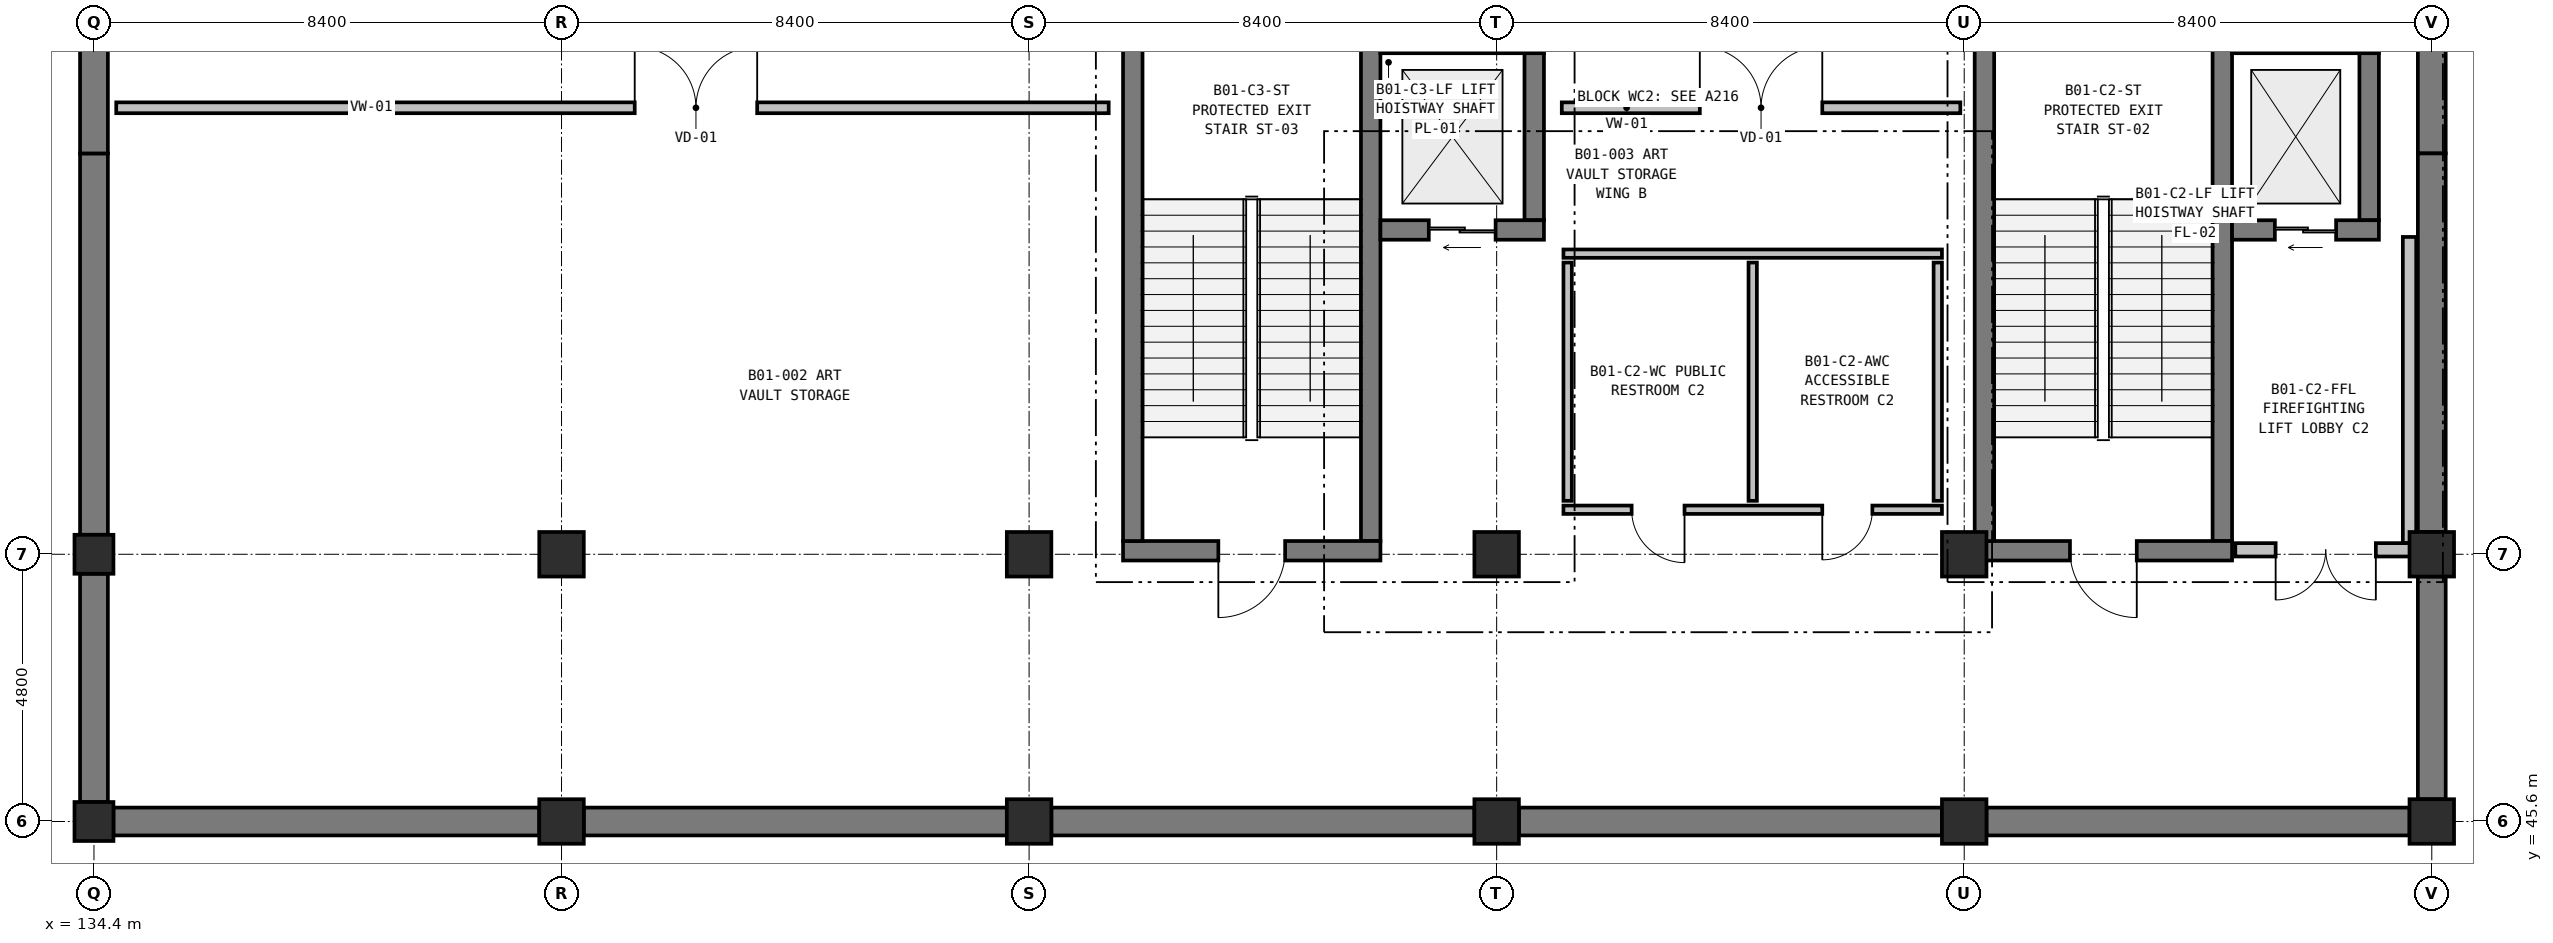
"""IFC4 building model, lengths in metres.
Left out: names, types, materials, properties, quantities, classifications, styles, units other than length and angle.
Written with IfcOpenShell. Run it as: python <this file> out.ifc"""

import sys

from ifc_helpers import new_model, si_unit, direction, frame, frame_2d, origin, origin_2d, place, context, subcontext, project, spatial, rectangle, extrude, element, fill, save


model = new_model("IFC4")
c1 = context("Model", 3, precision=1e-05, world=origin(), true_north=direction((0.0, 1.0)))
c2 = subcontext(c1, "Body", "Model", "MODEL_VIEW")
j1 = project(units=[si_unit("LENGTHUNIT", "METRE"), si_unit("PLANEANGLEUNIT", "RADIAN")], contexts=[c1])
p1 = place(None, origin())
s1 = spatial("IfcSite", under=j1, at=p1, CompositionType="ELEMENT")
p2 = place(p1, origin())
s2 = spatial("IfcBuilding", under=s1, at=p2, CompositionType="ELEMENT")
p3 = place(p2, frame((0.0, 0.0, -5.4)))
s3 = spatial("IfcBuildingStorey", under=s2, at=p3, CompositionType="ELEMENT", Elevation=-5.4)
for number, where, z_axis, x_axis in (
    (1, (134.4, 45.6, 0.0), (0.0, 0.0, 1.0), (1.0, 0.0, 0.0)),
    (2, (134.4, 50.4, 0.0), (0.0, 0.0, 1.0), (1.0, 0.0, 0.0)),
):
    element("IfcColumn", number, at=place(p3, frame(where, z_axis=z_axis, x_axis=x_axis)), inside=s3, PredefinedType="COLUMN", context=c2, shape_type="SweptSolid", body=[
        extrude(rectangle(XDim=0.7, YDim=0.7, at=origin_2d()), origin(), (0.0, 0.0, 1.0), 5.4),
    ])
for number, where, z_axis, x_axis in (
    (3, (142.8, 45.6, 0.0), (0.0, 0.0, 1.0), (1.0, 0.0, 0.0)),
    (4, (142.8, 50.4, 0.0), (0.0, 0.0, 1.0), (1.0, 0.0, 0.0)),
    (5, (151.2, 45.6, 0.0), (0.0, 0.0, 1.0), (1.0, 0.0, 0.0)),
    (6, (151.2, 50.4, 0.0), (0.0, 0.0, 1.0), (1.0, 0.0, 0.0)),
    (7, (159.6, 45.6, 0.0), (0.0, 0.0, 1.0), (1.0, 0.0, 0.0)),
    (8, (159.6, 50.4, 0.0), (0.0, 0.0, 1.0), (1.0, 0.0, 0.0)),
    (9, (168.0, 45.6, 0.0), (0.0, 0.0, 1.0), (1.0, 0.0, 0.0)),
    (10, (168.0, 50.4, 0.0), (0.0, 0.0, 1.0), (1.0, 0.0, 0.0)),
    (11, (176.4, 45.6, 0.0), (0.0, 0.0, 1.0), (1.0, 0.0, 0.0)),
    (12, (176.4, 50.4, 0.0), (0.0, 0.0, 1.0), (1.0, 0.0, 0.0)),
):
    element("IfcColumn", number, at=place(p3, frame(where, z_axis=z_axis, x_axis=x_axis)), inside=s3, PredefinedType="COLUMN", context=c2, shape_type="SweptSolid", body=[
        extrude(rectangle(XDim=0.8, YDim=0.8, at=origin_2d()), origin(), (0.0, 0.0, 1.0), 5.4),
    ])
p4 = place(p3, frame((176.4, 59.6, 0.0), z_axis=(0.0, 0.0, 1.0), x_axis=(0.0, -1.0, 0.0)))
e13 = element("IfcWall", 13, at=p4, inside=s3, PredefinedType="USERDEFINED", context=c2, shape_type="SweptSolid", body=[
    extrude(rectangle(XDim=2.0, YDim=0.5, at=frame_2d((1.0, 0.0))), origin(), (0.0, 0.0, 1.0), 5.06),
])
p5 = place(p3, frame((176.4, 57.6, 0.0), z_axis=(0.0, 0.0, 1.0), x_axis=(0.0, -1.0, 0.0)))
e14 = element("IfcWall", 14, at=p5, inside=s3, PredefinedType="USERDEFINED", context=c2, shape_type="SweptSolid", body=[
    extrude(rectangle(XDim=6.8, YDim=0.5, at=frame_2d((3.4, 0.0))), origin(), (0.0, 0.0, 1.0), 5.06),
])
p6 = place(p3, frame((176.4, 50.0, 0.0), z_axis=(0.0, 0.0, 1.0), x_axis=(0.0, -1.0, 0.0)))
e15 = element("IfcWall", 15, at=p6, inside=s3, PredefinedType="USERDEFINED", context=c2, shape_type="SweptSolid", body=[
    extrude(rectangle(XDim=4.0, YDim=0.5, at=frame_2d((2.0, 0.0))), origin(), (0.0, 0.0, 1.0), 5.06),
])
for number, where, z_axis, x_axis in (
    (16, (176.0, 45.6, 0.0), (0.0, 0.0, 1.0), (-1.0, 0.0, 0.0)),
    (17, (167.6, 45.6, 0.0), (0.0, 0.0, 1.0), (-1.0, 0.0, 0.0)),
):
    element("IfcWall", number, at=place(p3, frame(where, z_axis=z_axis, x_axis=x_axis)), inside=s3, PredefinedType="USERDEFINED", context=c2, shape_type="SweptSolid", body=[
        extrude(rectangle(XDim=7.6, YDim=0.5, at=frame_2d((3.8, 0.0))), origin(), (0.0, 0.0, 1.0), 5.06),
    ])
p7 = place(p3, frame((159.2, 45.6, 0.0), z_axis=(0.0, 0.0, 1.0), x_axis=(-1.0, 0.0, 0.0)))
e18 = element("IfcWall", 18, at=p7, inside=s3, PredefinedType="USERDEFINED", context=c2, shape_type="SweptSolid", body=[
    extrude(rectangle(XDim=7.6, YDim=0.5, at=frame_2d((3.8, 0.0))), origin(), (0.0, 0.0, 1.0), 5.06),
])
p8 = place(p3, frame((150.8, 45.6, 0.0), z_axis=(0.0, 0.0, 1.0), x_axis=(-1.0, 0.0, 0.0)))
e19 = element("IfcWall", 19, at=p8, inside=s3, PredefinedType="USERDEFINED", context=c2, shape_type="SweptSolid", body=[
    extrude(rectangle(XDim=7.6, YDim=0.5, at=frame_2d((3.8, 0.0))), origin(), (0.0, 0.0, 1.0), 5.06),
])
p9 = place(p3, frame((142.4, 45.6, 0.0), z_axis=(0.0, 0.0, 1.0), x_axis=(-1.0, 0.0, 0.0)))
e20 = element("IfcWall", 20, at=p9, inside=s3, PredefinedType="USERDEFINED", context=c2, shape_type="SweptSolid", body=[
    extrude(rectangle(XDim=7.65, YDim=0.5, at=frame_2d((3.825, 0.0))), origin(), (0.0, 0.0, 1.0), 5.06),
])
p10 = place(p3, frame((134.4, 45.95, 0.0), z_axis=(0.0, 0.0, 1.0), x_axis=(0.0, 1.0, 0.0)))
e21 = element("IfcWall", 21, at=p10, inside=s3, PredefinedType="USERDEFINED", context=c2, shape_type="SweptSolid", body=[
    extrude(rectangle(XDim=4.1, YDim=0.5, at=frame_2d((2.05, 0.0))), origin(), (0.0, 0.0, 1.0), 5.06),
])
p11 = place(p3, frame((134.4, 50.75, 0.0), z_axis=(0.0, 0.0, 1.0), x_axis=(0.0, 1.0, 0.0)))
e22 = element("IfcWall", 22, at=p11, inside=s3, PredefinedType="USERDEFINED", context=c2, shape_type="SweptSolid", body=[
    extrude(rectangle(XDim=6.85, YDim=0.5, at=frame_2d((3.425, 0.0))), origin(), (0.0, 0.0, 1.0), 5.06),
])
p12 = place(p3, frame((134.4, 57.6, 0.0), z_axis=(0.0, 0.0, 1.0), x_axis=(0.0, 1.0, 0.0)))
e23 = element("IfcWall", 23, at=p12, inside=s3, PredefinedType="USERDEFINED", context=c2, shape_type="SweptSolid", body=[
    extrude(rectangle(XDim=2.05, YDim=0.5, at=frame_2d((1.025, 0.0))), origin(), (0.0, 0.0, 1.0), 5.06),
])
p13 = place(p3, frame((172.637, 59.762, 0.0), z_axis=(0.0, 0.0, 1.0), x_axis=(0.0, -1.0, 0.0)))
e24 = element("IfcWall", 24, at=p13, inside=s3, PredefinedType="SHEAR", context=c2, shape_type="SweptSolid", body=[
    extrude(rectangle(XDim=9.124, YDim=0.35, at=frame_2d((4.562, 0.0))), origin(), (0.0, 0.0, 1.0), 5.06),
])
p14 = place(p3, frame((172.812, 50.463, 0.0), z_axis=(0.0, 0.0, 1.0), x_axis=(-1.0, 0.0, 0.0)))
e25 = element("IfcWall", 25, at=p14, inside=s3, PredefinedType="SHEAR", context=c2, shape_type="SweptSolid", body=[
    extrude(rectangle(XDim=4.624, YDim=0.35, at=frame_2d((2.312, 0.0))), origin(), (0.0, 0.0, 1.0), 5.06),
])
p15 = place(p14, frame((1.712, 0.0, 0.0)))
e26 = element("IfcOpeningElement", 26, at=p15, cuts=e25, PredefinedType="OPENING", context=c2, shape_type="SweptSolid", body=[
    extrude(rectangle(XDim=1.2, YDim=2.2, at=frame_2d((0.6, 1.1))), frame((0.0, 0.185, 0.0), z_axis=(0.0, -1.0, 0.0), x_axis=(1.0, 0.0, 0.0)), (0.0, 0.0, 1.0), 0.37),
])
p16 = place(p3, frame((168.363, 50.638, 0.0), z_axis=(0.0, 0.0, 1.0), x_axis=(0.0, 1.0, 0.0)))
e27 = element("IfcWall", 27, at=p16, inside=s3, PredefinedType="SHEAR", context=c2, shape_type="SweptSolid", body=[
    extrude(rectangle(XDim=9.124, YDim=0.35, at=frame_2d((4.562, 0.0))), origin(), (0.0, 0.0, 1.0), 5.06),
])
p17 = place(p3, frame((172.812, 59.575, 0.0), z_axis=(0.0, 0.0, 1.0), x_axis=(1.0, 0.0, 0.0)))
e28 = element("IfcWall", 28, at=p17, inside=s3, PredefinedType="SHEAR", context=c2, shape_type="SweptSolid", body=[
    extrude(rectangle(XDim=2.638, YDim=0.35, at=frame_2d((1.319, 0.0))), origin(), (0.0, 0.0, 1.0), 5.06),
])
p18 = place(p3, frame((175.275, 59.4, 0.0), z_axis=(0.0, 0.0, 1.0), x_axis=(0.0, -1.0, 0.0)))
e29 = element("IfcWall", 29, at=p18, inside=s3, PredefinedType="SHEAR", context=c2, shape_type="SweptSolid", body=[
    extrude(rectangle(XDim=3.0, YDim=0.35, at=frame_2d((1.5, 0.0))), origin(), (0.0, 0.0, 1.0), 5.06),
])
p19 = place(p3, frame((175.45, 56.225, 0.0), z_axis=(0.0, 0.0, 1.0), x_axis=(-1.0, 0.0, 0.0)))
e30 = element("IfcWall", 30, at=p19, inside=s3, PredefinedType="SHEAR", context=c2, shape_type="SweptSolid", body=[
    extrude(rectangle(XDim=2.638, YDim=0.35, at=frame_2d((1.319, 0.0))), origin(), (0.0, 0.0, 1.0), 5.06),
])
p20 = place(p19, frame((0.769, 0.0, 0.0)))
e31 = element("IfcOpeningElement", 31, at=p20, cuts=e30, PredefinedType="OPENING", context=c2, shape_type="SweptSolid", body=[
    extrude(rectangle(XDim=1.1, YDim=2.2, at=frame_2d((0.55, 1.1))), frame((0.0, 0.185, 0.0), z_axis=(0.0, -1.0, 0.0), x_axis=(1.0, 0.0, 0.0)), (0.0, 0.0, 1.0), 0.37),
])
p21 = place(p3, frame((176.0, 56.1, 0.0), z_axis=(0.0, 0.0, 1.0), x_axis=(0.0, -1.0, 0.0)))
e32 = element("IfcWall", 32, at=p21, inside=s3, PredefinedType="PARTITIONING", context=c2, shape_type="SweptSolid", body=[
    extrude(rectangle(XDim=5.5, YDim=0.24, at=frame_2d((2.75, 0.0))), origin(), (0.0, 0.0, 1.0), 4.385),
])
p22 = place(p3, frame((176.12, 50.48, 0.0), z_axis=(0.0, 0.0, 1.0), x_axis=(-1.0, 0.0, 0.0)))
e33 = element("IfcWall", 33, at=p22, inside=s3, PredefinedType="PARTITIONING", context=c2, shape_type="SweptSolid", body=[
    extrude(rectangle(XDim=3.25, YDim=0.24, at=frame_2d((1.625, 0.0))), origin(), (0.0, 0.0, 1.0), 4.385),
])
p23 = place(p22, frame((0.725, 0.0, 0.0)))
e34 = element("IfcOpeningElement", 34, at=p23, cuts=e33, PredefinedType="OPENING", context=c2, shape_type="SweptSolid", body=[
    extrude(rectangle(XDim=1.8, YDim=2.25, at=frame_2d((0.9, 1.125))), frame((0.0, 0.13, 0.0), z_axis=(0.0, -1.0, 0.0), x_axis=(1.0, 0.0, 0.0)), (0.0, 0.0, 1.0), 0.26),
])
p24 = place(p3, frame((167.6, 51.2, 0.0), z_axis=(0.0, 0.0, 1.0), x_axis=(-1.0, 0.0, 0.0)))
e35 = element("IfcWall", 35, at=p24, inside=s3, PredefinedType="PARTITIONING", context=c2, shape_type="SweptSolid", body=[
    extrude(rectangle(XDim=6.8, YDim=0.15, at=frame_2d((3.4, 0.0))), origin(), (0.0, 0.0, 1.0), 5.06),
])
p25 = place(p24, frame((1.25, 0.0, 0.0)))
e36 = element("IfcOpeningElement", 36, at=p25, cuts=e35, PredefinedType="OPENING", context=c2, shape_type="SweptSolid", body=[
    extrude(rectangle(XDim=0.9, YDim=2.1, at=frame_2d((0.45, 1.05))), frame((0.0, 0.085, 0.0), z_axis=(0.0, -1.0, 0.0), x_axis=(1.0, 0.0, 0.0)), (0.0, 0.0, 1.0), 0.17),
])
p26 = place(p24, frame((4.625, 0.0, 0.0)))
e37 = element("IfcOpeningElement", 37, at=p26, cuts=e35, PredefinedType="OPENING", context=c2, shape_type="SweptSolid", body=[
    extrude(rectangle(XDim=0.95, YDim=2.15, at=frame_2d((0.475, 1.075))), frame((0.0, 0.085, 0.0), z_axis=(0.0, -1.0, 0.0), x_axis=(1.0, 0.0, 0.0)), (0.0, 0.0, 1.0), 0.17),
])
p27 = place(p3, frame((160.8, 55.8, 0.0), z_axis=(0.0, 0.0, 1.0), x_axis=(1.0, 0.0, 0.0)))
e38 = element("IfcWall", 38, at=p27, inside=s3, PredefinedType="PARTITIONING", context=c2, shape_type="SweptSolid", body=[
    extrude(rectangle(XDim=6.8, YDim=0.15, at=frame_2d((3.4, 0.0))), origin(), (0.0, 0.0, 1.0), 5.06),
])
for number, where, z_axis, x_axis in (
    (39, (160.875, 51.36, 0.0), (0.0, 0.0, 1.0), (0.0, 1.0, 0.0)),
    (40, (164.2, 51.36, 0.0), (0.0, 0.0, 1.0), (0.0, 1.0, 0.0)),
    (41, (167.525, 51.36, 0.0), (0.0, 0.0, 1.0), (0.0, 1.0, 0.0)),
):
    element("IfcWall", number, at=place(p3, frame(where, z_axis=z_axis, x_axis=x_axis)), inside=s3, PredefinedType="PARTITIONING", context=c2, shape_type="SweptSolid", body=[
        extrude(rectangle(XDim=4.28, YDim=0.15, at=frame_2d((2.14, 0.0))), origin(), (0.0, 0.0, 1.0), 5.06),
    ])
p28 = place(p3, frame((157.337, 59.762, 0.0), z_axis=(0.0, 0.0, 1.0), x_axis=(0.0, -1.0, 0.0)))
e42 = element("IfcWall", 42, at=p28, inside=s3, PredefinedType="SHEAR", context=c2, shape_type="SweptSolid", body=[
    extrude(rectangle(XDim=9.124, YDim=0.35, at=frame_2d((4.562, 0.0))), origin(), (0.0, 0.0, 1.0), 5.06),
])
p29 = place(p3, frame((157.512, 50.463, 0.0), z_axis=(0.0, 0.0, 1.0), x_axis=(-1.0, 0.0, 0.0)))
e43 = element("IfcWall", 43, at=p29, inside=s3, PredefinedType="SHEAR", context=c2, shape_type="SweptSolid", body=[
    extrude(rectangle(XDim=4.624, YDim=0.35, at=frame_2d((2.312, 0.0))), origin(), (0.0, 0.0, 1.0), 5.06),
])
p30 = place(p29, frame((1.712, 0.0, 0.0)))
e44 = element("IfcOpeningElement", 44, at=p30, cuts=e43, PredefinedType="OPENING", context=c2, shape_type="SweptSolid", body=[
    extrude(rectangle(XDim=1.2, YDim=2.2, at=frame_2d((0.6, 1.1))), frame((0.0, 0.185, 0.0), z_axis=(0.0, -1.0, 0.0), x_axis=(1.0, 0.0, 0.0)), (0.0, 0.0, 1.0), 0.37),
])
p31 = place(p3, frame((153.063, 50.638, 0.0), z_axis=(0.0, 0.0, 1.0), x_axis=(0.0, 1.0, 0.0)))
e45 = element("IfcWall", 45, at=p31, inside=s3, PredefinedType="SHEAR", context=c2, shape_type="SweptSolid", body=[
    extrude(rectangle(XDim=9.124, YDim=0.35, at=frame_2d((4.562, 0.0))), origin(), (0.0, 0.0, 1.0), 5.06),
])
p32 = place(p3, frame((157.512, 59.575, 0.0), z_axis=(0.0, 0.0, 1.0), x_axis=(1.0, 0.0, 0.0)))
e46 = element("IfcWall", 46, at=p32, inside=s3, PredefinedType="SHEAR", context=c2, shape_type="SweptSolid", body=[
    extrude(rectangle(XDim=2.938, YDim=0.35, at=frame_2d((1.469, 0.0))), origin(), (0.0, 0.0, 1.0), 5.06),
])
p33 = place(p3, frame((160.275, 59.4, 0.0), z_axis=(0.0, 0.0, 1.0), x_axis=(0.0, -1.0, 0.0)))
e47 = element("IfcWall", 47, at=p33, inside=s3, PredefinedType="SHEAR", context=c2, shape_type="SweptSolid", body=[
    extrude(rectangle(XDim=3.0, YDim=0.35, at=frame_2d((1.5, 0.0))), origin(), (0.0, 0.0, 1.0), 5.06),
])
p34 = place(p3, frame((160.45, 56.225, 0.0), z_axis=(0.0, 0.0, 1.0), x_axis=(-1.0, 0.0, 0.0)))
e48 = element("IfcWall", 48, at=p34, inside=s3, PredefinedType="SHEAR", context=c2, shape_type="SweptSolid", body=[
    extrude(rectangle(XDim=2.938, YDim=0.35, at=frame_2d((1.469, 0.0))), origin(), (0.0, 0.0, 1.0), 5.06),
])
p35 = place(p34, frame((0.869, 0.0, 0.0)))
e49 = element("IfcOpeningElement", 49, at=p35, cuts=e48, PredefinedType="OPENING", context=c2, shape_type="SweptSolid", body=[
    extrude(rectangle(XDim=1.2, YDim=2.2, at=frame_2d((0.6, 1.1))), frame((0.0, 0.185, 0.0), z_axis=(0.0, -1.0, 0.0), x_axis=(1.0, 0.0, 0.0)), (0.0, 0.0, 1.0), 0.37),
])
p36 = place(p3, frame((134.8, 58.42, 0.0), z_axis=(0.0, 0.0, 1.0), x_axis=(1.0, 0.0, 0.0)))
e50 = element("IfcWall", 50, at=p36, inside=s3, PredefinedType="PARTITIONING", context=c2, shape_type="SweptSolid", body=[
    extrude(rectangle(XDim=17.83, YDim=0.195, at=frame_2d((8.915, 0.0))), origin(), (0.0, 0.0, 1.0), 4.235),
])
p37 = place(p36, frame((9.315, 0.0, 0.0)))
e51 = element("IfcOpeningElement", 51, at=p37, cuts=e50, PredefinedType="OPENING", context=c2, shape_type="SweptSolid", body=[
    extrude(rectangle(XDim=2.2, YDim=2.6, at=frame_2d((1.1, 1.3))), frame((0.0, 0.107, 0.0), z_axis=(0.0, -1.0, 0.0), x_axis=(1.0, 0.0, 0.0)), (0.0, 0.0, 1.0), 0.215),
])
p38 = place(p3, frame((160.77, 58.42, 0.0), z_axis=(0.0, 0.0, 1.0), x_axis=(1.0, 0.0, 0.0)))
e52 = element("IfcWall", 52, at=p38, inside=s3, PredefinedType="PARTITIONING", context=c2, shape_type="SweptSolid", body=[
    extrude(rectangle(XDim=7.16, YDim=0.195, at=frame_2d((3.58, 0.0))), origin(), (0.0, 0.0, 1.0), 4.235),
])
p39 = place(p38, frame((2.48, 0.0, 0.0)))
e53 = element("IfcOpeningElement", 53, at=p39, cuts=e52, PredefinedType="OPENING", context=c2, shape_type="SweptSolid", body=[
    extrude(rectangle(XDim=2.2, YDim=2.6, at=frame_2d((1.1, 1.3))), frame((0.0, 0.107, 0.0), z_axis=(0.0, -1.0, 0.0), x_axis=(1.0, 0.0, 0.0)), (0.0, 0.0, 1.0), 0.215),
])
p40 = place(p15, origin())
e54 = element("IfcDoor", 54, at=p40, inside=s3, OperationType="SINGLE_SWING_LEFT", PredefinedType="DOOR", context=c2, shape_type="SweptSolid", body=[
    extrude(rectangle(XDim=1.2, YDim=2.2, at=frame_2d((0.6, 1.1))), frame((0.0, 0.025, 0.0), z_axis=(0.0, -1.0, 0.0), x_axis=(1.0, 0.0, 0.0)), (0.0, 0.0, 1.0), 0.05),
])
fill(e26, e54)
p41 = place(p20, origin())
e55 = element("IfcDoor", 55, at=p41, inside=s3, OperationType="DOUBLE_DOOR_SLIDING", PredefinedType="DOOR", context=c2, shape_type="SweptSolid", body=[
    extrude(rectangle(XDim=1.1, YDim=2.2, at=frame_2d((0.55, 1.1))), frame((0.0, 0.025, 0.0), z_axis=(0.0, -1.0, 0.0), x_axis=(1.0, 0.0, 0.0)), (0.0, 0.0, 1.0), 0.05),
])
fill(e31, e55)
p42 = place(p23, origin())
e56 = element("IfcDoor", 56, at=p42, inside=s3, OperationType="DOUBLE_DOOR_SINGLE_SWING", PredefinedType="DOOR", context=c2, shape_type="SweptSolid", body=[
    extrude(rectangle(XDim=1.8, YDim=2.25, at=frame_2d((0.9, 1.125))), frame((0.0, 0.025, 0.0), z_axis=(0.0, -1.0, 0.0), x_axis=(1.0, 0.0, 0.0)), (0.0, 0.0, 1.0), 0.05),
])
fill(e34, e56)
p43 = place(p25, origin())
e57 = element("IfcDoor", 57, at=p43, inside=s3, OperationType="SINGLE_SWING_RIGHT", PredefinedType="DOOR", context=c2, shape_type="SweptSolid", body=[
    extrude(rectangle(XDim=0.9, YDim=2.1, at=frame_2d((0.45, 1.05))), frame((0.0, 0.025, 0.0), z_axis=(0.0, -1.0, 0.0), x_axis=(1.0, 0.0, 0.0)), (0.0, 0.0, 1.0), 0.05),
])
fill(e36, e57)
p44 = place(p26, origin())
e58 = element("IfcDoor", 58, at=p44, inside=s3, OperationType="SINGLE_SWING_LEFT", PredefinedType="DOOR", context=c2, shape_type="SweptSolid", body=[
    extrude(rectangle(XDim=0.95, YDim=2.15, at=frame_2d((0.475, 1.075))), frame((0.0, 0.025, 0.0), z_axis=(0.0, -1.0, 0.0), x_axis=(1.0, 0.0, 0.0)), (0.0, 0.0, 1.0), 0.05),
])
fill(e37, e58)
p45 = place(p30, origin())
e59 = element("IfcDoor", 59, at=p45, inside=s3, OperationType="SINGLE_SWING_RIGHT", PredefinedType="DOOR", context=c2, shape_type="SweptSolid", body=[
    extrude(rectangle(XDim=1.2, YDim=2.2, at=frame_2d((0.6, 1.1))), frame((0.0, 0.025, 0.0), z_axis=(0.0, -1.0, 0.0), x_axis=(1.0, 0.0, 0.0)), (0.0, 0.0, 1.0), 0.05),
])
fill(e44, e59)
p46 = place(p35, origin())
e60 = element("IfcDoor", 60, at=p46, inside=s3, OperationType="DOUBLE_DOOR_SLIDING", PredefinedType="DOOR", context=c2, shape_type="SweptSolid", body=[
    extrude(rectangle(XDim=1.2, YDim=2.2, at=frame_2d((0.6, 1.1))), frame((0.0, 0.025, 0.0), z_axis=(0.0, -1.0, 0.0), x_axis=(1.0, 0.0, 0.0)), (0.0, 0.0, 1.0), 0.05),
])
fill(e49, e60)
p47 = place(p37, origin())
e61 = element("IfcDoor", 61, at=p47, inside=s3, OperationType="DOUBLE_DOOR_SINGLE_SWING", PredefinedType="DOOR", context=c2, shape_type="SweptSolid", body=[
    extrude(rectangle(XDim=2.2, YDim=2.6, at=frame_2d((1.1, 1.3))), frame((0.0, 0.025, 0.0), z_axis=(0.0, -1.0, 0.0), x_axis=(1.0, 0.0, 0.0)), (0.0, 0.0, 1.0), 0.05),
])
fill(e51, e61)
p48 = place(p39, origin())
e62 = element("IfcDoor", 62, at=p48, inside=s3, OperationType="DOUBLE_DOOR_SINGLE_SWING", PredefinedType="DOOR", context=c2, shape_type="SweptSolid", body=[
    extrude(rectangle(XDim=2.2, YDim=2.6, at=frame_2d((1.1, 1.3))), frame((0.0, 0.025, 0.0), z_axis=(0.0, -1.0, 0.0), x_axis=(1.0, 0.0, 0.0)), (0.0, 0.0, 1.0), 0.05),
])
fill(e53, e62)
save(model, sys.argv[1])
